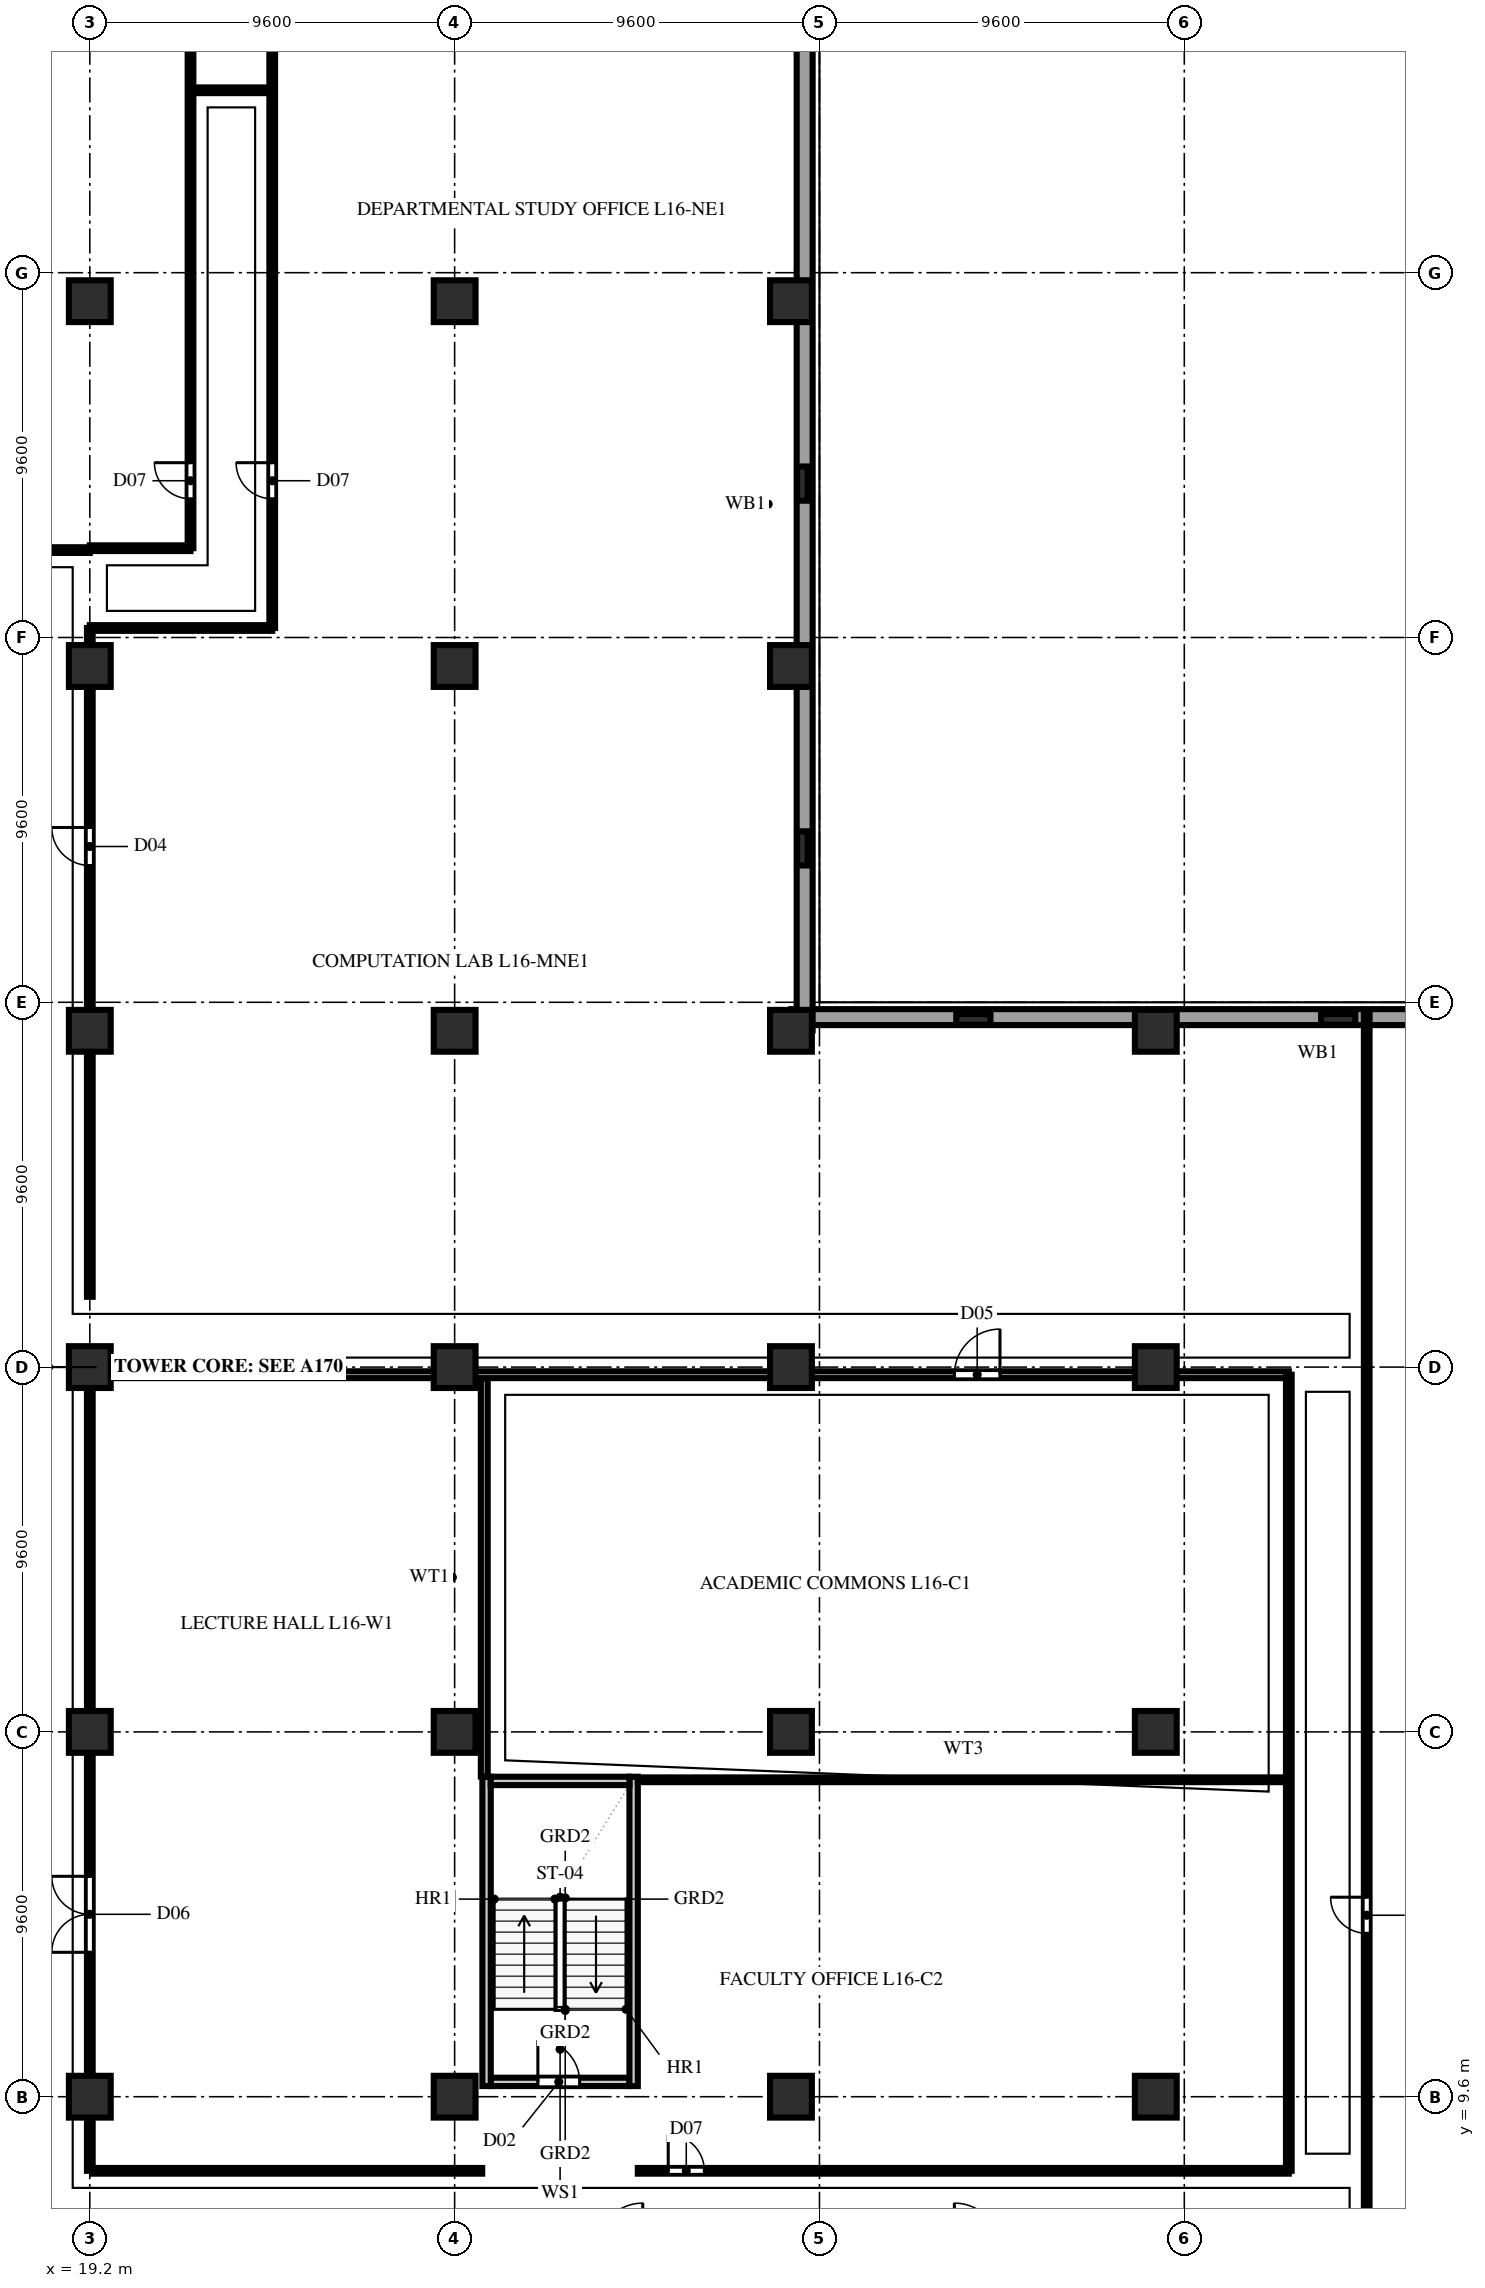
"""IFC4 building model, lengths in metres.
Left out: names, types, materials, properties, quantities, classifications, styles, units other than length and angle.
Written with IfcOpenShell. Run it as: python <this file> out.ifc"""

import sys

from ifc_helpers import new_model, si_unit, direction, frame, frame_2d, origin, origin_2d, place, context, subcontext, project, spatial, rectangle, extrude, element, fill, save


model = new_model("IFC4")
c1 = context("Model", 3, precision=1e-05, world=origin(), true_north=direction((0.0, 1.0)))
c2 = subcontext(c1, "Body", "Model", "MODEL_VIEW")
j1 = project(units=[si_unit("LENGTHUNIT", "METRE"), si_unit("PLANEANGLEUNIT", "RADIAN")], contexts=[c1])
p1 = place(None, origin())
s1 = spatial("IfcSite", under=j1, at=p1, CompositionType="ELEMENT")
p2 = place(p1, origin())
s2 = spatial("IfcBuilding", under=s1, at=p2, CompositionType="ELEMENT")
p3 = place(p2, frame((0.0, 0.0, 66.0)))
s3 = spatial("IfcBuildingStorey", under=s2, at=p3, CompositionType="ELEMENT", Elevation=66.0)
for number, where, z_axis, x_axis in (
    (1, (19.2, 9.6, 0.0), (0.0, 0.0, 1.0), (1.0, 0.0, 0.0)),
    (2, (19.2, 19.2, 0.0), (0.0, 0.0, 1.0), (1.0, 0.0, 0.0)),
    (3, (19.2, 28.8, 0.0), (0.0, 0.0, 1.0), (1.0, 0.0, 0.0)),
    (4, (19.2, 37.65, 0.0), (0.0, 0.0, 1.0), (1.0, 0.0, 0.0)),
    (5, (19.2, 47.25, 0.0), (0.0, 0.0, 1.0), (1.0, 0.0, 0.0)),
    (6, (19.2, 56.85, 0.0), (0.0, 0.0, 1.0), (1.0, 0.0, 0.0)),
    (7, (28.8, 9.6, 0.0), (0.0, 0.0, 1.0), (1.0, 0.0, 0.0)),
    (8, (28.8, 19.2, 0.0), (0.0, 0.0, 1.0), (1.0, 0.0, 0.0)),
    (9, (28.8, 28.8, 0.0), (0.0, 0.0, 1.0), (1.0, 0.0, 0.0)),
    (10, (28.8, 37.65, 0.0), (0.0, 0.0, 1.0), (1.0, 0.0, 0.0)),
    (11, (28.8, 47.25, 0.0), (0.0, 0.0, 1.0), (1.0, 0.0, 0.0)),
    (12, (28.8, 56.85, 0.0), (0.0, 0.0, 1.0), (1.0, 0.0, 0.0)),
    (13, (37.65, 9.6, 0.0), (0.0, 0.0, 1.0), (1.0, 0.0, 0.0)),
    (14, (37.65, 19.2, 0.0), (0.0, 0.0, 1.0), (1.0, 0.0, 0.0)),
    (15, (37.65, 28.8, 0.0), (0.0, 0.0, 1.0), (1.0, 0.0, 0.0)),
    (16, (37.65, 37.65, 0.0), (0.0, 0.0, 1.0), (1.0, 0.0, 0.0)),
    (17, (37.65, 47.25, 0.0), (0.0, 0.0, 1.0), (1.0, 0.0, 0.0)),
    (18, (37.65, 56.85, 0.0), (0.0, 0.0, 1.0), (1.0, 0.0, 0.0)),
    (19, (47.25, 9.6, 0.0), (0.0, 0.0, 1.0), (1.0, 0.0, 0.0)),
    (20, (47.25, 19.2, 0.0), (0.0, 0.0, 1.0), (1.0, 0.0, 0.0)),
    (21, (47.25, 28.8, 0.0), (0.0, 0.0, 1.0), (1.0, 0.0, 0.0)),
    (22, (47.25, 37.65, 0.0), (0.0, 0.0, 1.0), (1.0, 0.0, 0.0)),
):
    element("IfcColumn", number, at=place(p3, frame(where, z_axis=z_axis, x_axis=x_axis)), inside=s3, PredefinedType="COLUMN", context=c2, shape_type="SweptSolid", body=[
        extrude(rectangle(XDim=1.1, YDim=1.1, at=origin_2d()), origin(), (0.0, 0.0, 1.0), 3.8),
    ])
for number, where, z_axis, x_axis in (
    (23, (37.95, 42.45, 0.0), (0.0, 0.0, 1.0), (0.0, 1.0, 0.0)),
    (24, (37.95, 52.05, 0.0), (0.0, 0.0, 1.0), (0.0, 1.0, 0.0)),
    (25, (42.45, 37.95, 0.0), (0.0, 0.0, 1.0), (1.0, 0.0, 0.0)),
    (26, (52.05, 37.95, 0.0), (0.0, 0.0, 1.0), (1.0, 0.0, 0.0)),
):
    element("IfcColumn", number, at=place(p3, frame(where, z_axis=z_axis, x_axis=x_axis)), inside=s3, PredefinedType="PILASTER", context=c2, shape_type="SweptSolid", body=[
        extrude(rectangle(XDim=0.9, YDim=0.28, at=origin_2d()), origin(), (0.0, 0.0, 1.0), 3.8),
    ])
for number, where, z_axis, x_axis in (
    (27, (65.36, 38.01, 0.0), (0.0, 0.0, 1.0), (-1.0, 0.0, 0.0)),
    (28, (38.01, 37.66, 0.0), (0.0, 0.0, 1.0), (0.0, 1.0, 0.0)),
):
    element("IfcWall", number, at=place(p3, frame(where, z_axis=z_axis, x_axis=x_axis)), inside=s3, PredefinedType="SOLIDWALL", context=c2, shape_type="SweptSolid", body=[
        extrude(rectangle(XDim=27.7, YDim=0.42, at=frame_2d((13.85, 0.0))), origin(), (0.0, 0.0, 1.0), 3.54),
    ])
p4 = place(p3, frame((29.75, 9.99, 0.0), z_axis=(0.0, 0.0, 1.0), x_axis=(1.0, 0.0, 0.0)))
e29 = element("IfcWall", 29, at=p4, inside=s3, PredefinedType="SOLIDWALL", context=c2, shape_type="SweptSolid", body=[
    extrude(rectangle(XDim=3.65, YDim=0.22, at=frame_2d((1.825, 0.0))), origin(), (0.0, 0.0, 1.0), 3.54),
])
p5 = place(p4, frame((1.24, 0.0, 0.0)))
e30 = element("IfcOpeningElement", 30, at=p5, cuts=e29, PredefinedType="OPENING", context=c2, shape_type="SweptSolid", body=[
    extrude(rectangle(XDim=1.1, YDim=2.2, at=frame_2d((0.55, 1.1))), frame((0.0, 0.122, 0.0), z_axis=(0.0, -1.0, 0.0), x_axis=(1.0, 0.0, 0.0)), (0.0, 0.0, 1.0), 0.244),
])
for number, where, z_axis, x_axis in (
    (31, (29.64, 9.88, 0.0), (0.0, 0.0, 1.0), (0.0, 1.0, 0.0)),
    (32, (33.51, 9.88, 0.0), (0.0, 0.0, 1.0), (0.0, 1.0, 0.0)),
):
    element("IfcWall", number, at=place(p3, frame(where, z_axis=z_axis, x_axis=x_axis)), inside=s3, PredefinedType="SOLIDWALL", context=c2, shape_type="SweptSolid", body=[
        extrude(rectangle(XDim=8.14, YDim=0.22, at=frame_2d((4.07, 0.0))), origin(), (0.0, 0.0, 1.0), 3.54),
    ])
p6 = place(p3, frame((29.75, 17.91, 0.0), z_axis=(0.0, 0.0, 1.0), x_axis=(1.0, 0.0, 0.0)))
e33 = element("IfcWall", 33, at=p6, inside=s3, PredefinedType="SOLIDWALL", context=c2, shape_type="SweptSolid", body=[
    extrude(rectangle(XDim=3.65, YDim=0.22, at=frame_2d((1.825, 0.0))), origin(), (0.0, 0.0, 1.0), 3.54),
])
p7 = place(p3, frame((17.05, 50.3, 0.0), z_axis=(0.0, 0.0, 1.0), x_axis=(1.0, 0.0, 0.0)))
e34 = element("IfcWall", 34, at=p7, inside=s3, PredefinedType="PARTITIONING", context=c2, shape_type="SweptSolid", body=[
    extrude(rectangle(XDim=2.15, YDim=0.15, at=frame_2d((1.075, 0.0))), origin(), (0.0, 0.0, 1.0), 3.54),
])
p8 = place(p3, frame((52.8, 0.22, 0.0), z_axis=(0.0, 0.0, 1.0), x_axis=(0.0, 1.0, 0.0)))
e35 = element("IfcWall", 35, at=p8, inside=s3, PredefinedType="PARTITIONING", context=c2, shape_type="SweptSolid", body=[
    extrude(rectangle(XDim=37.96, YDim=0.15, at=frame_2d((18.98, 0.0))), origin(), (0.0, 0.0, 1.0), 3.54),
])
p9 = place(p8, frame((13.68, 0.0, 0.0)))
e36 = element("IfcOpeningElement", 36, at=p9, cuts=e35, PredefinedType="OPENING", context=c2, shape_type="SweptSolid", body=[
    extrude(rectangle(XDim=0.95, YDim=2.15, at=frame_2d((0.475, 1.075))), frame((0.0, 0.087, 0.0), z_axis=(0.0, -1.0, 0.0), x_axis=(1.0, 0.0, 0.0)), (0.0, 0.0, 1.0), 0.174),
])
p10 = place(p3, frame((19.2, 7.65, 0.0), z_axis=(0.0, 0.0, 1.0), x_axis=(0.0, 1.0, 0.0)))
e37 = element("IfcWall", 37, at=p10, inside=s3, PredefinedType="PARTITIONING", context=c2, shape_type="SweptSolid", body=[
    extrude(rectangle(XDim=20.95, YDim=0.15, at=frame_2d((10.475, 0.0))), origin(), (0.0, 0.0, 1.0), 2.923),
])
p11 = place(p10, frame((5.75, 0.0, 0.0)))
e38 = element("IfcOpeningElement", 38, at=p11, cuts=e37, PredefinedType="OPENING", context=c2, shape_type="SweptSolid", body=[
    extrude(rectangle(XDim=2.0, YDim=2.3, at=frame_2d((1.0, 1.15))), frame((0.0, 0.087, 0.0), z_axis=(0.0, -1.0, 0.0), x_axis=(1.0, 0.0, 0.0)), (0.0, 0.0, 1.0), 0.174),
])
p12 = place(p3, frame((29.58, 18.025, 0.0), z_axis=(0.0, 0.0, 1.0), x_axis=(0.0, 1.0, 0.0)))
e39 = element("IfcWall", 39, at=p12, inside=s3, PredefinedType="PARTITIONING", context=c2, shape_type="SweptSolid", body=[
    extrude(rectangle(XDim=10.48, YDim=0.18, at=frame_2d((5.24, 0.0))), origin(), (0.0, 0.0, 1.0), 3.54),
])
p13 = place(p3, frame((19.28, 28.6, 0.0), z_axis=(0.0, 0.0, 1.0), x_axis=(1.0, 0.0, 0.0)))
e40 = element("IfcWall", 40, at=p13, inside=s3, PredefinedType="PARTITIONING", context=c2, shape_type="SweptSolid", body=[
    extrude(rectangle(XDim=31.47, YDim=0.18, at=frame_2d((15.735, 0.0))), origin(), (0.0, 0.0, 1.0), 3.54),
])
p14 = place(p13, frame((22.67, 0.0, 0.0)))
e41 = element("IfcOpeningElement", 41, at=p14, cuts=e40, PredefinedType="OPENING", context=c2, shape_type="SweptSolid", body=[
    extrude(rectangle(XDim=1.2, YDim=2.2, at=frame_2d((0.6, 1.1))), frame((0.0, 0.102, 0.0), z_axis=(0.0, -1.0, 0.0), x_axis=(1.0, 0.0, 0.0)), (0.0, 0.0, 1.0), 0.204),
])
p15 = place(p3, frame((19.28, 7.65, 0.0), z_axis=(0.0, 0.0, 1.0), x_axis=(1.0, 0.0, 0.0)))
e42 = element("IfcWall", 42, at=p15, inside=s3, PredefinedType="PARTITIONING", context=c2, shape_type="SweptSolid", body=[
    extrude(rectangle(XDim=10.245, YDim=0.15, at=frame_2d((5.123, 0.0))), origin(), (0.0, 0.0, 1.0), 3.54),
])
p16 = place(p3, frame((33.62, 17.94, 0.0), z_axis=(0.0, 0.0, 1.0), x_axis=(1.0, 0.0, 0.0)))
e43 = element("IfcWall", 43, at=p16, inside=s3, PredefinedType="PARTITIONING", context=c2, shape_type="SweptSolid", body=[
    extrude(rectangle(XDim=17.13, YDim=0.125, at=frame_2d((8.565, 0.0))), origin(), (0.0, 0.0, 1.0), 3.54),
])
p17 = place(p3, frame((33.62, 7.65, 0.0), z_axis=(0.0, 0.0, 1.0), x_axis=(1.0, 0.0, 0.0)))
e44 = element("IfcWall", 44, at=p17, inside=s3, PredefinedType="PARTITIONING", context=c2, shape_type="SweptSolid", body=[
    extrude(rectangle(XDim=17.13, YDim=0.15, at=frame_2d((8.565, 0.0))), origin(), (0.0, 0.0, 1.0), 3.54),
])
p18 = place(p17, frame((0.8, 0.0, 0.0)))
e45 = element("IfcOpeningElement", 45, at=p18, cuts=e44, PredefinedType="OPENING", context=c2, shape_type="SweptSolid", body=[
    extrude(rectangle(XDim=0.95, YDim=2.15, at=frame_2d((0.475, 1.075))), frame((0.0, 0.087, 0.0), z_axis=(0.0, -1.0, 0.0), x_axis=(1.0, 0.0, 0.0)), (0.0, 0.0, 1.0), 0.174),
])
p19 = place(p3, frame((50.75, 7.65, 0.0), z_axis=(0.0, 0.0, 1.0), x_axis=(0.0, 1.0, 0.0)))
e46 = element("IfcWall", 46, at=p19, inside=s3, PredefinedType="PARTITIONING", context=c2, shape_type="SweptSolid", body=[
    extrude(rectangle(XDim=20.95, YDim=0.15, at=frame_2d((10.475, 0.0))), origin(), (0.0, 0.0, 1.0), 3.54),
])
p20 = place(p3, frame((19.2, 30.65, 0.0), z_axis=(0.0, 0.0, 1.0), x_axis=(0.0, 1.0, 0.0)))
e47 = element("IfcWall", 47, at=p20, inside=s3, PredefinedType="PARTITIONING", context=c2, shape_type="SweptSolid", body=[
    extrude(rectangle(XDim=17.6, YDim=0.15, at=frame_2d((8.8, 0.0))), origin(), (0.0, 0.0, 1.0), 2.923),
])
p21 = place(p20, frame((11.35, 0.0, 0.0)))
e48 = element("IfcOpeningElement", 48, at=p21, cuts=e47, PredefinedType="OPENING", context=c2, shape_type="SweptSolid", body=[
    extrude(rectangle(XDim=1.0, YDim=2.2, at=frame_2d((0.5, 1.1))), frame((0.0, 0.087, 0.0), z_axis=(0.0, -1.0, 0.0), x_axis=(1.0, 0.0, 0.0)), (0.0, 0.0, 1.0), 0.174),
])
p22 = place(p3, frame((19.2, 48.25, 0.0), z_axis=(0.0, 0.0, 1.0), x_axis=(1.0, 0.0, 0.0)))
e49 = element("IfcWall", 49, at=p22, inside=s3, PredefinedType="PARTITIONING", context=c2, shape_type="SweptSolid", body=[
    extrude(rectangle(XDim=4.8, YDim=0.15, at=frame_2d((2.4, 0.0))), origin(), (0.0, 0.0, 1.0), 3.54),
])
p23 = place(p3, frame((19.2, 50.35, 0.0), z_axis=(0.0, 0.0, 1.0), x_axis=(1.0, 0.0, 0.0)))
e50 = element("IfcWall", 50, at=p23, inside=s3, PredefinedType="PARTITIONING", context=c2, shape_type="SweptSolid", body=[
    extrude(rectangle(XDim=2.65, YDim=0.15, at=frame_2d((1.325, 0.0))), origin(), (0.0, 0.0, 1.0), 3.54),
])
p24 = place(p3, frame((21.85, 62.4, 0.0), z_axis=(0.0, 0.0, 1.0), x_axis=(1.0, 0.0, 0.0)))
e51 = element("IfcWall", 51, at=p24, inside=s3, PredefinedType="PARTITIONING", context=c2, shape_type="SweptSolid", body=[
    extrude(rectangle(XDim=2.15, YDim=0.15, at=frame_2d((1.075, 0.0))), origin(), (0.0, 0.0, 1.0), 3.54),
])
p25 = place(p3, frame((24.0, 48.25, 0.0), z_axis=(0.0, 0.0, 1.0), x_axis=(0.0, 1.0, 0.0)))
e52 = element("IfcWall", 52, at=p25, inside=s3, PredefinedType="PARTITIONING", context=c2, shape_type="SweptSolid", body=[
    extrude(rectangle(XDim=18.73, YDim=0.15, at=frame_2d((9.365, 0.0))), origin(), (0.0, 0.0, 1.0), 3.54),
])
p26 = place(p25, frame((3.4, 0.0, 0.0)))
e53 = element("IfcOpeningElement", 53, at=p26, cuts=e52, PredefinedType="OPENING", context=c2, shape_type="SweptSolid", body=[
    extrude(rectangle(XDim=0.95, YDim=2.15, at=frame_2d((0.475, 1.075))), frame((0.0, 0.087, 0.0), z_axis=(0.0, -1.0, 0.0), x_axis=(1.0, 0.0, 0.0)), (0.0, 0.0, 1.0), 0.174),
])
p27 = place(p3, frame((21.85, 50.35, 0.0), z_axis=(0.0, 0.0, 1.0), x_axis=(0.0, 1.0, 0.0)))
e54 = element("IfcWall", 54, at=p27, inside=s3, PredefinedType="PARTITIONING", context=c2, shape_type="SweptSolid", body=[
    extrude(rectangle(XDim=16.63, YDim=0.15, at=frame_2d((8.315, 0.0))), origin(), (0.0, 0.0, 1.0), 3.54),
])
p28 = place(p27, frame((1.3, 0.0, 0.0)))
e55 = element("IfcOpeningElement", 55, at=p28, cuts=e54, PredefinedType="OPENING", context=c2, shape_type="SweptSolid", body=[
    extrude(rectangle(XDim=0.95, YDim=2.15, at=frame_2d((0.475, 1.075))), frame((0.0, 0.087, 0.0), z_axis=(0.0, -1.0, 0.0), x_axis=(1.0, 0.0, 0.0)), (0.0, 0.0, 1.0), 0.174),
])
p29 = place(p5, origin())
e56 = element("IfcDoor", 56, at=p29, inside=s3, OperationType="SINGLE_SWING_LEFT", PredefinedType="DOOR", context=c2, shape_type="SweptSolid", body=[
    extrude(rectangle(XDim=1.1, YDim=2.2, at=frame_2d((0.55, 1.1))), frame((0.0, 0.025, 0.0), z_axis=(0.0, -1.0, 0.0), x_axis=(1.0, 0.0, 0.0)), (0.0, 0.0, 1.0), 0.05),
])
fill(e30, e56)
p30 = place(p9, origin())
e57 = element("IfcDoor", 57, at=p30, inside=s3, OperationType="SINGLE_SWING_RIGHT", PredefinedType="DOOR", context=c2, shape_type="SweptSolid", body=[
    extrude(rectangle(XDim=0.95, YDim=2.15, at=frame_2d((0.475, 1.075))), frame((0.0, 0.025, 0.0), z_axis=(0.0, -1.0, 0.0), x_axis=(1.0, 0.0, 0.0)), (0.0, 0.0, 1.0), 0.05),
])
fill(e36, e57)
p31 = place(p11, origin())
e58 = element("IfcDoor", 58, at=p31, inside=s3, OperationType="DOUBLE_SWING_LEFT", PredefinedType="DOOR", context=c2, shape_type="SweptSolid", body=[
    extrude(rectangle(XDim=2.0, YDim=2.3, at=frame_2d((1.0, 1.15))), frame((0.0, 0.025, 0.0), z_axis=(0.0, -1.0, 0.0), x_axis=(1.0, 0.0, 0.0)), (0.0, 0.0, 1.0), 0.05),
])
fill(e38, e58)
p32 = place(p14, origin())
e59 = element("IfcDoor", 59, at=p32, inside=s3, OperationType="SINGLE_SWING_RIGHT", PredefinedType="DOOR", context=c2, shape_type="SweptSolid", body=[
    extrude(rectangle(XDim=1.2, YDim=2.2, at=frame_2d((0.6, 1.1))), frame((0.0, 0.025, 0.0), z_axis=(0.0, -1.0, 0.0), x_axis=(1.0, 0.0, 0.0)), (0.0, 0.0, 1.0), 0.05),
])
fill(e41, e59)
p33 = place(p18, origin())
e60 = element("IfcDoor", 60, at=p33, inside=s3, OperationType="SINGLE_SWING_LEFT", PredefinedType="DOOR", context=c2, shape_type="SweptSolid", body=[
    extrude(rectangle(XDim=0.95, YDim=2.15, at=frame_2d((0.475, 1.075))), frame((0.0, 0.025, 0.0), z_axis=(0.0, -1.0, 0.0), x_axis=(1.0, 0.0, 0.0)), (0.0, 0.0, 1.0), 0.05),
])
fill(e45, e60)
p34 = place(p21, origin())
e61 = element("IfcDoor", 61, at=p34, inside=s3, OperationType="SINGLE_SWING_RIGHT", PredefinedType="DOOR", context=c2, shape_type="SweptSolid", body=[
    extrude(rectangle(XDim=1.0, YDim=2.2, at=frame_2d((0.5, 1.1))), frame((0.0, 0.025, 0.0), z_axis=(0.0, -1.0, 0.0), x_axis=(1.0, 0.0, 0.0)), (0.0, 0.0, 1.0), 0.05),
])
fill(e48, e61)
p35 = place(p26, origin())
e62 = element("IfcDoor", 62, at=p35, inside=s3, OperationType="SINGLE_SWING_RIGHT", PredefinedType="DOOR", context=c2, shape_type="SweptSolid", body=[
    extrude(rectangle(XDim=0.95, YDim=2.15, at=frame_2d((0.475, 1.075))), frame((0.0, 0.025, 0.0), z_axis=(0.0, -1.0, 0.0), x_axis=(1.0, 0.0, 0.0)), (0.0, 0.0, 1.0), 0.05),
])
fill(e53, e62)
p36 = place(p28, origin())
e63 = element("IfcDoor", 63, at=p36, inside=s3, OperationType="SINGLE_SWING_RIGHT", PredefinedType="DOOR", context=c2, shape_type="SweptSolid", body=[
    extrude(rectangle(XDim=0.95, YDim=2.15, at=frame_2d((0.475, 1.075))), frame((0.0, 0.025, 0.0), z_axis=(0.0, -1.0, 0.0), x_axis=(1.0, 0.0, 0.0)), (0.0, 0.0, 1.0), 0.05),
])
fill(e55, e63)
save(model, sys.argv[1])
